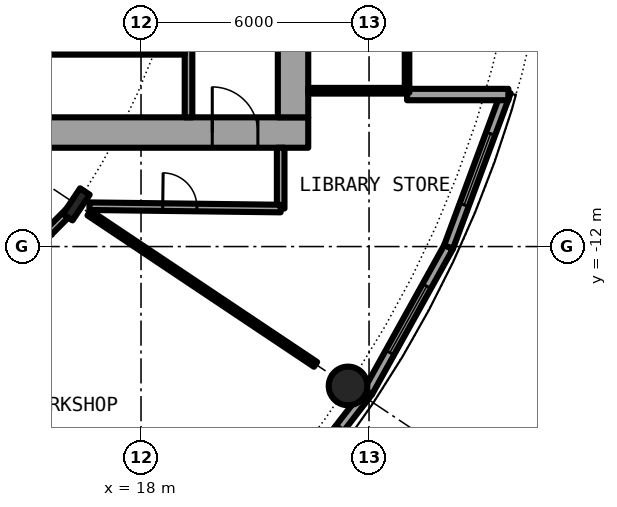
"""IFC4 building model, lengths in metres.
Left out: names, types, materials, properties, quantities, classifications, styles, units other than length and angle.
Written with IfcOpenShell. Run it as: python <this file> out.ifc"""

import sys

from ifc_helpers import new_model, si_unit, direction, frame, frame_2d, origin, origin_2d, place, context, subcontext, project, spatial, rectangle, hollow_circle, i_section, extrude, element, fill, save


model = new_model("IFC4")
c1 = context("Model", 3, precision=1e-05, world=origin(), true_north=direction((0.0, 1.0)))
c2 = subcontext(c1, "Body", "Model", "MODEL_VIEW")
j1 = project(units=[si_unit("LENGTHUNIT", "METRE"), si_unit("PLANEANGLEUNIT", "RADIAN")], contexts=[c1])
p1 = place(None, origin())
s1 = spatial("IfcSite", under=j1, at=p1, CompositionType="ELEMENT")
p2 = place(p1, origin())
s2 = spatial("IfcBuilding", under=s1, at=p2, CompositionType="ELEMENT")
p3 = place(p2, frame((0.0, 0.0, 14.1)))
s3 = spatial("IfcBuildingStorey", under=s2, at=p3, CompositionType="ELEMENT", Elevation=14.1)
p4 = place(p3, frame((23.448, -15.667, 0.0), z_axis=(0.0, 0.0, 1.0), x_axis=(1.0, 0.0, 0.0)))
e1 = element("IfcColumn", 1, at=p4, inside=s3, PredefinedType="COLUMN", context=c2, shape_type="SweptSolid", body=[
    extrude(hollow_circle(Radius=0.508, WallThickness=0.05, at=origin_2d()), origin(), (0.0, 0.0, 1.0), 4.2),
])
p5 = place(p3, frame((16.297, -10.889, 0.0), z_axis=(0.0, 0.0, 1.0), x_axis=(0.831469612303, -0.55557023302, 0.0)))
e2 = element("IfcColumn", 2, at=p5, inside=s3, PredefinedType="COLUMN", context=c2, shape_type="SweptSolid", body=[
    extrude(i_section(OverallWidth=0.303, OverallDepth=0.814, WebThickness=0.021, FlangeThickness=0.04, FilletRadius=0.03, at=origin_2d()), origin(), (0.0, 0.0, 1.0), 4.2),
])
p6 = place(p3, frame((21.304, -19.268, 0.0), z_axis=(0.0, 0.0, 1.0), x_axis=(0.612637256412, 0.790364214812, 0.0)))
e3 = element("IfcWall", 3, at=p6, inside=s3, PredefinedType="SOLIDWALL", context=c2, shape_type="SweptSolid", body=[
    extrude(rectangle(XDim=4.36, YDim=0.25, at=frame_2d((2.18, 0.0))), origin(), (0.0, 0.0, 1.0), 3.8),
])
p7 = place(p6, frame((1.18, 0.0, 0.9)))
e4 = element("IfcOpeningElement", 4, at=p7, cuts=e3, PredefinedType="OPENING", context=c2, shape_type="SweptSolid", body=[
    extrude(rectangle(XDim=2.0, YDim=2.4, at=frame_2d((1.0, 1.2))), frame((0.0, 0.135, 0.0), z_axis=(0.0, -1.0, 0.0), x_axis=(1.0, 0.0, 0.0)), (0.0, 0.0, 1.0), 0.27),
])
p8 = place(p3, frame((23.975, -15.822, 0.0), z_axis=(0.0, 0.0, 1.0), x_axis=(0.485761785263, 0.8740912355, 0.0)))
e5 = element("IfcWall", 5, at=p8, inside=s3, PredefinedType="SOLIDWALL", context=c2, shape_type="SweptSolid", body=[
    extrude(rectangle(XDim=4.36, YDim=0.25, at=frame_2d((2.18, 0.0))), origin(), (0.0, 0.0, 1.0), 3.8),
])
p9 = place(p8, frame((1.18, 0.0, 0.9)))
e6 = element("IfcOpeningElement", 6, at=p9, cuts=e5, PredefinedType="OPENING", context=c2, shape_type="SweptSolid", body=[
    extrude(rectangle(XDim=2.0, YDim=2.4, at=frame_2d((1.0, 1.2))), frame((0.0, 0.135, 0.0), z_axis=(0.0, -1.0, 0.0), x_axis=(1.0, 0.0, 0.0)), (0.0, 0.0, 1.0), 0.27),
])
p10 = place(p3, frame((26.093, -12.011, 0.0), z_axis=(0.0, 0.0, 1.0), x_axis=(0.348003729264, 0.937493148998, 0.0)))
e7 = element("IfcWall", 7, at=p10, inside=s3, PredefinedType="SOLIDWALL", context=c2, shape_type="SweptSolid", body=[
    extrude(rectangle(XDim=4.359, YDim=0.25, at=frame_2d((2.18, 0.0))), origin(), (0.0, 0.0, 1.0), 3.8),
])
p11 = place(p10, frame((1.18, 0.0, 0.9)))
e8 = element("IfcOpeningElement", 8, at=p11, cuts=e7, PredefinedType="OPENING", context=c2, shape_type="SweptSolid", body=[
    extrude(rectangle(XDim=2.0, YDim=2.4, at=frame_2d((1.0, 1.2))), frame((0.0, 0.135, 0.0), z_axis=(0.0, -1.0, 0.0), x_axis=(1.0, 0.0, 0.0)), (0.0, 0.0, 1.0), 0.27),
])
p12 = place(p3, frame((25.0, -8.0, 0.0), z_axis=(0.0, 0.0, 1.0), x_axis=(1.0, 0.0, 0.0)))
e9 = element("IfcWall", 9, at=p12, inside=s3, PredefinedType="SOLIDWALL", context=c2, shape_type="SweptSolid", body=[
    extrude(rectangle(XDim=2.667, YDim=0.3, at=frame_2d((1.333, 0.0))), origin(), (0.0, 0.0, 1.0), 3.8),
])
p13 = place(p3, frame((8.2, -9.0, 0.0), z_axis=(0.0, 0.0, 1.0), x_axis=(1.0, 0.0, 0.0)))
e10 = element("IfcWall", 10, at=p13, inside=s3, PredefinedType="SHEAR", context=c2, shape_type="SweptSolid", body=[
    extrude(rectangle(XDim=14.2, YDim=0.8, at=frame_2d((7.1, 0.0))), origin(), (0.0, 0.0, 1.0), 4.2),
])
p14 = place(p13, frame((11.675, 0.0, 0.0)))
e11 = element("IfcOpeningElement", 11, at=p14, cuts=e10, PredefinedType="OPENING", context=c2, shape_type="SweptSolid", body=[
    extrude(rectangle(XDim=1.2, YDim=2.3, at=frame_2d((0.6, 1.15))), frame((0.0, 0.41, 0.0), z_axis=(0.0, -1.0, 0.0), x_axis=(1.0, 0.0, 0.0)), (0.0, 0.0, 1.0), 0.82),
])
p15 = place(p3, frame((22.0, 8.6, 0.0), z_axis=(0.0, 0.0, 1.0), x_axis=(0.0, -1.0, 0.0)))
e12 = element("IfcWall", 12, at=p15, inside=s3, PredefinedType="SHEAR", context=c2, shape_type="SweptSolid", body=[
    extrude(rectangle(XDim=17.2, YDim=0.8, at=frame_2d((8.6, 0.0))), origin(), (0.0, 0.0, 1.0), 4.2),
])
p16 = place(p15, frame((7.7, 0.0, 0.0)))
e13 = element("IfcOpeningElement", 13, at=p16, cuts=e12, PredefinedType="OPENING", context=c2, shape_type="SweptSolid", body=[
    extrude(rectangle(XDim=1.8, YDim=2.3, at=frame_2d((0.9, 1.15))), frame((0.0, 0.41, 0.0), z_axis=(0.0, -1.0, 0.0), x_axis=(1.0, 0.0, 0.0)), (0.0, 0.0, 1.0), 0.82),
])
p17 = place(p3, frame((19.25, -8.6, 0.0), z_axis=(0.0, 0.0, 1.0), x_axis=(0.0, 1.0, 0.0)))
e14 = element("IfcWall", 14, at=p17, inside=s3, PredefinedType="SOLIDWALL", context=c2, shape_type="SweptSolid", body=[
    extrude(rectangle(XDim=7.025, YDim=0.2, at=frame_2d((3.513, 0.0))), origin(), (0.0, 0.0, 1.0), 3.8),
])
p18 = place(p17, frame((2.35, 0.0, 0.0)))
e15 = element("IfcOpeningElement", 15, at=p18, cuts=e14, PredefinedType="OPENING", context=c2, shape_type="SweptSolid", body=[
    extrude(rectangle(XDim=1.1, YDim=2.3, at=frame_2d((0.55, 1.15))), frame((0.0, 0.11, 0.0), z_axis=(0.0, -1.0, 0.0), x_axis=(1.0, 0.0, 0.0)), (0.0, 0.0, 1.0), 0.22),
])
p19 = place(p3, frame((15.45, -6.875, 0.0), z_axis=(0.0, 0.0, 1.0), x_axis=(1.0, 0.0, 0.0)))
e16 = element("IfcWall", 16, at=p19, inside=s3, PredefinedType="PARTITIONING", context=c2, shape_type="SweptSolid", body=[
    extrude(rectangle(XDim=3.7, YDim=0.15, at=frame_2d((1.85, 0.0))), origin(), (0.0, 0.0, 1.0), 3.8),
])
p20 = place(p19, frame((1.4, 0.0, 0.0)))
e17 = element("IfcOpeningElement", 17, at=p20, cuts=e16, PredefinedType="OPENING", context=c2, shape_type="SweptSolid", body=[
    extrude(rectangle(XDim=0.9, YDim=2.3, at=frame_2d((0.45, 1.15))), frame((0.0, 0.085, 0.0), z_axis=(0.0, -1.0, 0.0), x_axis=(1.0, 0.0, 0.0)), (0.0, 0.0, 1.0), 0.17),
])
p21 = place(p3, frame((22.4, -7.9, 0.0), z_axis=(0.0, 0.0, 1.0), x_axis=(1.0, 0.0, 0.0)))
e18 = element("IfcWall", 18, at=p21, inside=s3, PredefinedType="PARTITIONING", context=c2, shape_type="SweptSolid", body=[
    extrude(rectangle(XDim=2.54, YDim=0.15, at=frame_2d((1.27, 0.0))), origin(), (0.0, 0.0, 1.0), 3.8),
])
p22 = place(p3, frame((25.0, -7.95, 0.0), z_axis=(0.0, 0.0, 1.0), x_axis=(0.0, 1.0, 0.0)))
e19 = element("IfcWall", 19, at=p22, inside=s3, PredefinedType="PARTITIONING", context=c2, shape_type="SweptSolid", body=[
    extrude(rectangle(XDim=15.9, YDim=0.12, at=frame_2d((7.95, 0.0))), origin(), (0.0, 0.0, 1.0), 3.8),
])
p23 = place(p22, frame((0.95, 0.0, 0.1)))
e20 = element("IfcOpeningElement", 20, at=p23, cuts=e19, PredefinedType="OPENING", context=c2, shape_type="SweptSolid", body=[
    extrude(rectangle(XDim=14.0, YDim=3.45, at=frame_2d((7.0, 1.725))), frame((0.0, 0.07, 0.0), z_axis=(0.0, -1.0, 0.0), x_axis=(1.0, 0.0, 0.0)), (0.0, 0.0, 1.0), 0.14),
])
p24 = place(p3, frame((21.675, -11.0, 0.0), z_axis=(0.0, 0.0, 1.0), x_axis=(0.0, 1.0, 0.0)))
e21 = element("IfcWall", 21, at=p24, inside=s3, PredefinedType="PARTITIONING", context=c2, shape_type="SweptSolid", body=[
    extrude(rectangle(XDim=1.6, YDim=0.2, at=frame_2d((0.8, 0.0))), origin(), (0.0, 0.0, 1.0), 3.8),
])
p25 = place(p3, frame((10.998, -16.188, 0.0), z_axis=(0.0, 0.0, 1.0), x_axis=(0.707106781187, 0.707106781187, 0.0)))
e22 = element("IfcWall", 22, at=p25, inside=s3, PredefinedType="PARTITIONING", context=c2, shape_type="SweptSolid", body=[
    extrude(rectangle(XDim=7.34, YDim=0.2, at=frame_2d((3.67, 0.0))), origin(), (0.0, 0.0, 1.0), 3.38),
])
p26 = place(p25, frame((3.17, 0.0, 0.0)))
e23 = element("IfcOpeningElement", 23, at=p26, cuts=e22, PredefinedType="OPENING", context=c2, shape_type="SweptSolid", body=[
    extrude(rectangle(XDim=1.0, YDim=2.3, at=frame_2d((0.5, 1.15))), frame((0.0, 0.11, 0.0), z_axis=(0.0, -1.0, 0.0), x_axis=(1.0, 0.0, 0.0)), (0.0, 0.0, 1.0), 0.22),
])
p27 = place(p3, frame((16.643, -10.938, 0.0), z_axis=(0.0, 0.0, 1.0), x_axis=(0.999924074118, -0.012322580895, 0.0)))
e24 = element("IfcWall", 24, at=p27, inside=s3, PredefinedType="PARTITIONING", context=c2, shape_type="SweptSolid", body=[
    extrude(rectangle(XDim=5.032, YDim=0.2, at=frame_2d((2.516, 0.0))), origin(), (0.0, 0.0, 1.0), 3.8),
])
p28 = place(p27, frame((1.928, 0.0, 0.0)))
e25 = element("IfcOpeningElement", 25, at=p28, cuts=e24, PredefinedType="OPENING", context=c2, shape_type="SweptSolid", body=[
    extrude(rectangle(XDim=0.9, YDim=2.3, at=frame_2d((0.45, 1.15))), frame((0.0, 0.11, 0.0), z_axis=(0.0, -1.0, 0.0), x_axis=(1.0, 0.0, 0.0)), (0.0, 0.0, 1.0), 0.22),
])
p29 = place(p3, frame((16.633, -11.118, 0.0), z_axis=(0.0, 0.0, 1.0), x_axis=(0.831415754305, -0.555650828752, 0.0)))
e26 = element("IfcWall", 26, at=p29, inside=s3, PredefinedType="PARTITIONING", context=c2, shape_type="SweptSolid", body=[
    extrude(rectangle(XDim=7.168, YDim=0.15, at=frame_2d((3.584, 0.0))), origin(), (0.0, 0.0, 1.0), 3.8),
])
p30 = place(p7, origin())
e27 = element("IfcWindow", 27, at=p30, inside=s3, PartitioningType="SINGLE_PANEL", PredefinedType="WINDOW", context=c2, shape_type="SweptSolid", body=[
    extrude(rectangle(XDim=2.0, YDim=2.4, at=frame_2d((1.0, 1.2))), frame((0.0, 0.03, 0.0), z_axis=(0.0, -1.0, 0.0), x_axis=(1.0, 0.0, 0.0)), (0.0, 0.0, 1.0), 0.06),
])
fill(e4, e27)
p31 = place(p9, origin())
e28 = element("IfcWindow", 28, at=p31, inside=s3, PartitioningType="SINGLE_PANEL", PredefinedType="WINDOW", context=c2, shape_type="SweptSolid", body=[
    extrude(rectangle(XDim=2.0, YDim=2.4, at=frame_2d((1.0, 1.2))), frame((0.0, 0.03, 0.0), z_axis=(0.0, -1.0, 0.0), x_axis=(1.0, 0.0, 0.0)), (0.0, 0.0, 1.0), 0.06),
])
fill(e6, e28)
p32 = place(p11, origin())
e29 = element("IfcWindow", 29, at=p32, inside=s3, PartitioningType="SINGLE_PANEL", PredefinedType="WINDOW", context=c2, shape_type="SweptSolid", body=[
    extrude(rectangle(XDim=2.0, YDim=2.4, at=frame_2d((1.0, 1.2))), frame((0.0, 0.03, 0.0), z_axis=(0.0, -1.0, 0.0), x_axis=(1.0, 0.0, 0.0)), (0.0, 0.0, 1.0), 0.06),
])
fill(e8, e29)
p33 = place(p20, origin())
e30 = element("IfcDoor", 30, at=p33, inside=s3, OperationType="SINGLE_SWING_LEFT", PredefinedType="DOOR", context=c2, shape_type="SweptSolid", body=[
    extrude(rectangle(XDim=0.9, YDim=2.3, at=frame_2d((0.45, 1.15))), frame((0.0, 0.025, 0.0), z_axis=(0.0, -1.0, 0.0), x_axis=(1.0, 0.0, 0.0)), (0.0, 0.0, 1.0), 0.05),
])
fill(e17, e30)
p34 = place(p14, origin())
e31 = element("IfcDoor", 31, at=p34, inside=s3, OperationType="SINGLE_SWING_LEFT", PredefinedType="DOOR", context=c2, shape_type="SweptSolid", body=[
    extrude(rectangle(XDim=1.2, YDim=2.3, at=frame_2d((0.6, 1.15))), frame((0.0, 0.025, 0.0), z_axis=(0.0, -1.0, 0.0), x_axis=(1.0, 0.0, 0.0)), (0.0, 0.0, 1.0), 0.05),
])
fill(e11, e31)
p35 = place(p23, origin())
e32 = element("IfcWindow", 32, at=p35, inside=s3, PartitioningType="SINGLE_PANEL", PredefinedType="WINDOW", context=c2, shape_type="SweptSolid", body=[
    extrude(rectangle(XDim=14.0, YDim=3.45, at=frame_2d((7.0, 1.725))), frame((0.0, 0.03, 0.0), z_axis=(0.0, -1.0, 0.0), x_axis=(1.0, 0.0, 0.0)), (0.0, 0.0, 1.0), 0.06),
])
fill(e20, e32)
p36 = place(p28, origin())
e33 = element("IfcDoor", 33, at=p36, inside=s3, OperationType="SINGLE_SWING_LEFT", PredefinedType="DOOR", context=c2, shape_type="SweptSolid", body=[
    extrude(rectangle(XDim=0.9, YDim=2.3, at=frame_2d((0.45, 1.15))), frame((0.0, 0.025, 0.0), z_axis=(0.0, -1.0, 0.0), x_axis=(1.0, 0.0, 0.0)), (0.0, 0.0, 1.0), 0.05),
])
fill(e25, e33)
save(model, sys.argv[1])
